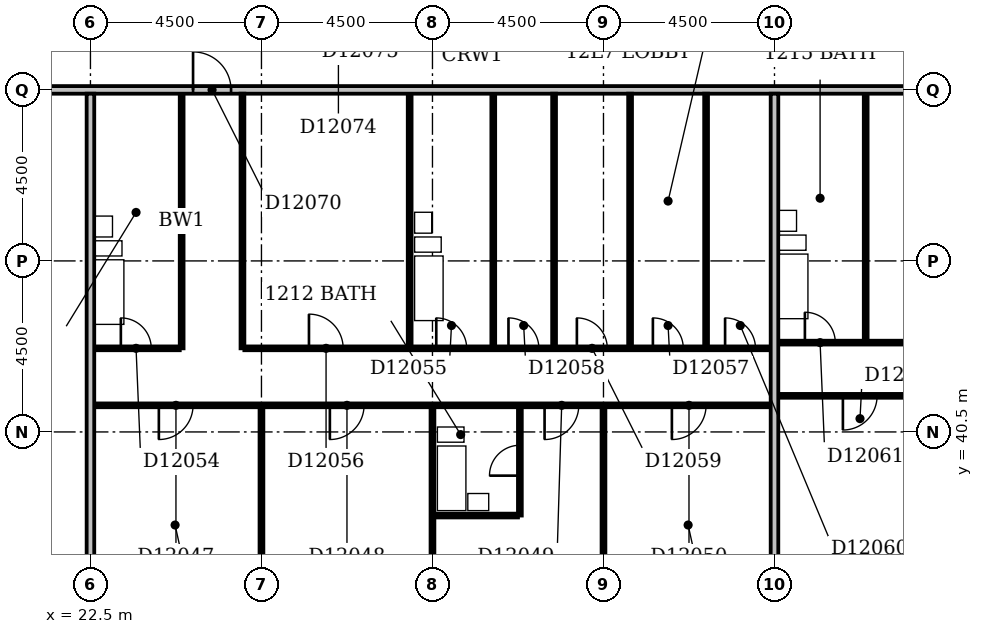
"""IFC4 building model, lengths in metres.
Left out: names, types, materials, properties, quantities, classifications, styles, units other than length and angle.
Written with IfcOpenShell. Run it as: python <this file> out.ifc"""

import sys

from ifc_helpers import new_model, si_unit, direction, frame, frame_2d, origin, place, context, subcontext, project, spatial, rectangle, extrude, element, fill, save


model = new_model("IFC4")
c1 = context("Model", 3, precision=1e-05, world=origin(), true_north=direction((0.0, 1.0)))
c2 = subcontext(c1, "Body", "Model", "MODEL_VIEW")
j1 = project(units=[si_unit("LENGTHUNIT", "METRE"), si_unit("PLANEANGLEUNIT", "RADIAN")], contexts=[c1])
p1 = place(None, origin())
s1 = spatial("IfcSite", under=j1, at=p1, CompositionType="ELEMENT")
p2 = place(p1, origin())
s2 = spatial("IfcBuilding", under=s1, at=p2, CompositionType="ELEMENT")
p3 = place(p2, frame((0.0, 0.0, 54.2)))
s3 = spatial("IfcBuildingStorey", under=s2, at=p3, CompositionType="ELEMENT", Elevation=54.2)
p4 = place(p3, frame((22.5, 36.6, 0.0), z_axis=(0.0, 0.0, 1.0), x_axis=(0.0, 1.0, 0.0)))
e1 = element("IfcWall", 1, at=p4, inside=s3, PredefinedType="PARTITIONING", context=c2, shape_type="SweptSolid", body=[
    extrude(rectangle(XDim=12.8, YDim=0.2, at=frame_2d((6.4, 0.0))), origin(), (0.0, 0.0, 1.0), 3.3),
])
p5 = place(p3, frame((27.0, 36.6, 0.0), z_axis=(0.0, 0.0, 1.0), x_axis=(0.0, 1.0, 0.0)))
e2 = element("IfcWall", 2, at=p5, inside=s3, PredefinedType="PARTITIONING", context=c2, shape_type="SweptSolid", body=[
    extrude(rectangle(XDim=4.55, YDim=0.1, at=frame_2d((2.275, 0.0))), origin(), (0.0, 0.0, 1.0), 2.6),
])
p6 = place(p3, frame((31.5, 36.6, 0.0), z_axis=(0.0, 0.0, 1.0), x_axis=(0.0, 1.0, 0.0)))
e3 = element("IfcWall", 3, at=p6, inside=s3, PredefinedType="PARTITIONING", context=c2, shape_type="SweptSolid", body=[
    extrude(rectangle(XDim=4.55, YDim=0.1, at=frame_2d((2.275, 0.0))), origin(), (0.0, 0.0, 1.0), 3.3),
])
p7 = place(p3, frame((36.0, 36.6, 0.0), z_axis=(0.0, 0.0, 1.0), x_axis=(0.0, 1.0, 0.0)))
e4 = element("IfcWall", 4, at=p7, inside=s3, PredefinedType="PARTITIONING", context=c2, shape_type="SweptSolid", body=[
    extrude(rectangle(XDim=4.55, YDim=0.1, at=frame_2d((2.275, 0.0))), origin(), (0.0, 0.0, 1.0), 2.4),
])
p8 = place(p3, frame((40.5, 36.6, 0.0), z_axis=(0.0, 0.0, 1.0), x_axis=(0.0, 1.0, 0.0)))
e5 = element("IfcWall", 5, at=p8, inside=s3, PredefinedType="PARTITIONING", context=c2, shape_type="SweptSolid", body=[
    extrude(rectangle(XDim=12.8, YDim=0.2, at=frame_2d((6.4, 0.0))), origin(), (0.0, 0.0, 1.0), 3.3),
])
p9 = place(p3, frame((31.55, 38.3, 0.0), z_axis=(0.0, 0.0, 1.0), x_axis=(1.0, 0.0, 0.0)))
e6 = element("IfcWall", 6, at=p9, inside=s3, PredefinedType="PLUMBINGWALL", context=c2, shape_type="SweptSolid", body=[
    extrude(rectangle(XDim=2.2, YDim=0.1, at=frame_2d((1.1, 0.0))), origin(), (0.0, 0.0, 1.0), 3.3),
])
p10 = place(p3, frame((33.8, 38.3, 0.0), z_axis=(0.0, 0.0, 1.0), x_axis=(0.0, 1.0, 0.0)))
e7 = element("IfcWall", 7, at=p10, inside=s3, PredefinedType="PLUMBINGWALL", context=c2, shape_type="SweptSolid", body=[
    extrude(rectangle(XDim=2.85, YDim=0.1, at=frame_2d((1.425, 0.0))), origin(), (0.0, 0.0, 1.0), 3.3),
])
p11 = place(p10, frame((1.05, 0.0, 0.0)))
e8 = element("IfcOpeningElement", 8, at=p11, cuts=e7, PredefinedType="OPENING", context=c2, shape_type="SweptSolid", body=[
    extrude(rectangle(XDim=0.8, YDim=2.1, at=frame_2d((0.4, 1.05))), frame((0.0, 0.062, 0.0), z_axis=(0.0, -1.0, 0.0), x_axis=(1.0, 0.0, 0.0)), (0.0, 0.0, 1.0), 0.124),
])
p12 = place(p3, frame((22.6, 41.2, 0.0), z_axis=(0.0, 0.0, 1.0), x_axis=(1.0, 0.0, 0.0)))
e9 = element("IfcWall", 9, at=p12, inside=s3, PredefinedType="PARTITIONING", context=c2, shape_type="SweptSolid", body=[
    extrude(rectangle(XDim=17.8, YDim=0.1, at=frame_2d((8.9, 0.0))), origin(), (0.0, 0.0, 1.0), 3.3),
])
p13 = place(p12, frame((1.7, 0.0, 0.0)))
e10 = element("IfcOpeningElement", 10, at=p13, cuts=e9, PredefinedType="OPENING", context=c2, shape_type="SweptSolid", body=[
    extrude(rectangle(XDim=0.9, YDim=2.1, at=frame_2d((0.45, 1.05))), frame((0.0, 0.062, 0.0), z_axis=(0.0, -1.0, 0.0), x_axis=(1.0, 0.0, 0.0)), (0.0, 0.0, 1.0), 0.124),
])
p14 = place(p12, frame((6.2, 0.0, 0.0)))
e11 = element("IfcOpeningElement", 11, at=p14, cuts=e9, PredefinedType="OPENING", context=c2, shape_type="SweptSolid", body=[
    extrude(rectangle(XDim=0.9, YDim=2.1, at=frame_2d((0.45, 1.05))), frame((0.0, 0.062, 0.0), z_axis=(0.0, -1.0, 0.0), x_axis=(1.0, 0.0, 0.0)), (0.0, 0.0, 1.0), 0.124),
])
p15 = place(p12, frame((11.85, 0.0, 0.0)))
e12 = element("IfcOpeningElement", 12, at=p15, cuts=e9, PredefinedType="OPENING", context=c2, shape_type="SweptSolid", body=[
    extrude(rectangle(XDim=0.9, YDim=2.1, at=frame_2d((0.45, 1.05))), frame((0.0, 0.062, 0.0), z_axis=(0.0, -1.0, 0.0), x_axis=(1.0, 0.0, 0.0)), (0.0, 0.0, 1.0), 0.124),
])
p16 = place(p12, frame((15.2, 0.0, 0.0)))
e13 = element("IfcOpeningElement", 13, at=p16, cuts=e9, PredefinedType="OPENING", context=c2, shape_type="SweptSolid", body=[
    extrude(rectangle(XDim=0.9, YDim=2.1, at=frame_2d((0.45, 1.05))), frame((0.0, 0.062, 0.0), z_axis=(0.0, -1.0, 0.0), x_axis=(1.0, 0.0, 0.0)), (0.0, 0.0, 1.0), 0.124),
])
p17 = place(p3, frame((40.6, 41.45, 0.0), z_axis=(0.0, 0.0, 1.0), x_axis=(1.0, 0.0, 0.0)))
e14 = element("IfcWall", 14, at=p17, inside=s3, PredefinedType="PARTITIONING", context=c2, shape_type="SweptSolid", body=[
    extrude(rectangle(XDim=13.3, YDim=0.1, at=frame_2d((6.65, 0.0))), origin(), (0.0, 0.0, 1.0), 3.3),
])
p18 = place(p17, frame((1.7, 0.0, 0.0)))
e15 = element("IfcOpeningElement", 15, at=p18, cuts=e14, PredefinedType="OPENING", context=c2, shape_type="SweptSolid", body=[
    extrude(rectangle(XDim=0.9, YDim=2.1, at=frame_2d((0.45, 1.05))), frame((0.0, 0.062, 0.0), z_axis=(0.0, -1.0, 0.0), x_axis=(1.0, 0.0, 0.0)), (0.0, 0.0, 1.0), 0.124),
])
p19 = place(p17, frame((6.2, 0.0, 0.0)))
e16 = element("IfcOpeningElement", 16, at=p19, cuts=e14, PredefinedType="OPENING", context=c2, shape_type="SweptSolid", body=[
    extrude(rectangle(XDim=0.9, YDim=2.1, at=frame_2d((0.45, 1.05))), frame((0.0, 0.062, 0.0), z_axis=(0.0, -1.0, 0.0), x_axis=(1.0, 0.0, 0.0)), (0.0, 0.0, 1.0), 0.124),
])
p20 = place(p17, frame((10.7, 0.0, 0.0)))
e17 = element("IfcOpeningElement", 17, at=p20, cuts=e14, PredefinedType="OPENING", context=c2, shape_type="SweptSolid", body=[
    extrude(rectangle(XDim=0.9, YDim=2.1, at=frame_2d((0.45, 1.05))), frame((0.0, 0.062, 0.0), z_axis=(0.0, -1.0, 0.0), x_axis=(1.0, 0.0, 0.0)), (0.0, 0.0, 1.0), 0.124),
])
p21 = place(p3, frame((22.6, 42.7, 0.0), z_axis=(0.0, 0.0, 1.0), x_axis=(1.0, 0.0, 0.0)))
e18 = element("IfcWall", 18, at=p21, inside=s3, PredefinedType="PARTITIONING", context=c2, shape_type="SweptSolid", body=[
    extrude(rectangle(XDim=2.25, YDim=0.1, at=frame_2d((1.125, 0.0))), origin(), (0.0, 0.0, 1.0), 3.3),
])
p22 = place(p21, frame((0.7, 0.0, 0.0)))
e19 = element("IfcOpeningElement", 19, at=p22, cuts=e18, PredefinedType="OPENING", context=c2, shape_type="SweptSolid", body=[
    extrude(rectangle(XDim=0.8, YDim=2.1, at=frame_2d((0.4, 1.05))), frame((0.0, 0.062, 0.0), z_axis=(0.0, -1.0, 0.0), x_axis=(1.0, 0.0, 0.0)), (0.0, 0.0, 1.0), 0.124),
])
p23 = place(p3, frame((24.9, 42.7, 0.0), z_axis=(0.0, 0.0, 1.0), x_axis=(0.0, 1.0, 0.0)))
e20 = element("IfcWall", 20, at=p23, inside=s3, PredefinedType="PLUMBINGWALL", context=c2, shape_type="SweptSolid", body=[
    extrude(rectangle(XDim=6.7, YDim=0.1, at=frame_2d((3.35, 0.0))), origin(), (0.0, 0.0, 1.0), 3.3),
])
p24 = place(p3, frame((26.5, 42.7, 0.0), z_axis=(0.0, 0.0, 1.0), x_axis=(0.0, 1.0, 0.0)))
e21 = element("IfcWall", 21, at=p24, inside=s3, PredefinedType="PARTITIONING", context=c2, shape_type="SweptSolid", body=[
    extrude(rectangle(XDim=6.7, YDim=0.1, at=frame_2d((3.35, 0.0))), origin(), (0.0, 0.0, 1.0), 2.6),
])
p25 = place(p3, frame((26.55, 42.7, 0.0), z_axis=(0.0, 0.0, 1.0), x_axis=(1.0, 0.0, 0.0)))
e22 = element("IfcWall", 22, at=p25, inside=s3, PredefinedType="PARTITIONING", context=c2, shape_type="SweptSolid", body=[
    extrude(rectangle(XDim=13.85, YDim=0.1, at=frame_2d((6.925, 0.0))), origin(), (0.0, 0.0, 1.0), 3.3),
])
p26 = place(p25, frame((5.05, 0.0, 0.0)))
e23 = element("IfcOpeningElement", 23, at=p26, cuts=e22, PredefinedType="OPENING", context=c2, shape_type="SweptSolid", body=[
    extrude(rectangle(XDim=0.8, YDim=2.1, at=frame_2d((0.4, 1.05))), frame((0.0, 0.062, 0.0), z_axis=(0.0, -1.0, 0.0), x_axis=(1.0, 0.0, 0.0)), (0.0, 0.0, 1.0), 0.124),
])
p27 = place(p25, frame((1.7, 0.0, 0.0)))
e24 = element("IfcOpeningElement", 24, at=p27, cuts=e22, PredefinedType="OPENING", context=c2, shape_type="SweptSolid", body=[
    extrude(rectangle(XDim=0.9, YDim=2.1, at=frame_2d((0.45, 1.05))), frame((0.0, 0.062, 0.0), z_axis=(0.0, -1.0, 0.0), x_axis=(1.0, 0.0, 0.0)), (0.0, 0.0, 1.0), 0.124),
])
p28 = place(p25, frame((10.75, 0.0, 0.0)))
e25 = element("IfcOpeningElement", 25, at=p28, cuts=e22, PredefinedType="OPENING", context=c2, shape_type="SweptSolid", body=[
    extrude(rectangle(XDim=0.8, YDim=2.1, at=frame_2d((0.4, 1.05))), frame((0.0, 0.062, 0.0), z_axis=(0.0, -1.0, 0.0), x_axis=(1.0, 0.0, 0.0)), (0.0, 0.0, 1.0), 0.124),
])
p29 = place(p25, frame((6.95, 0.0, 0.0)))
e26 = element("IfcOpeningElement", 26, at=p29, cuts=e22, PredefinedType="OPENING", context=c2, shape_type="SweptSolid", body=[
    extrude(rectangle(XDim=0.8, YDim=2.1, at=frame_2d((0.4, 1.05))), frame((0.0, 0.062, 0.0), z_axis=(0.0, -1.0, 0.0), x_axis=(1.0, 0.0, 0.0)), (0.0, 0.0, 1.0), 0.124),
])
p30 = place(p25, frame((8.75, 0.0, 0.0)))
e27 = element("IfcOpeningElement", 27, at=p30, cuts=e22, PredefinedType="OPENING", context=c2, shape_type="SweptSolid", body=[
    extrude(rectangle(XDim=0.8, YDim=2.1, at=frame_2d((0.4, 1.05))), frame((0.0, 0.062, 0.0), z_axis=(0.0, -1.0, 0.0), x_axis=(1.0, 0.0, 0.0)), (0.0, 0.0, 1.0), 0.124),
])
p31 = place(p25, frame((12.65, 0.0, 0.0)))
e28 = element("IfcOpeningElement", 28, at=p31, cuts=e22, PredefinedType="OPENING", context=c2, shape_type="SweptSolid", body=[
    extrude(rectangle(XDim=0.8, YDim=2.1, at=frame_2d((0.4, 1.05))), frame((0.0, 0.062, 0.0), z_axis=(0.0, -1.0, 0.0), x_axis=(1.0, 0.0, 0.0)), (0.0, 0.0, 1.0), 0.124),
])
for number, where, z_axis, x_axis in (
    (29, (30.9, 42.75, 0.0), (0.0, 0.0, 1.0), (0.0, 1.0, 0.0)),
    (30, (33.1, 42.75, 0.0), (0.0, 0.0, 1.0), (0.0, 1.0, 0.0)),
):
    element("IfcWall", number, at=place(p3, frame(where, z_axis=z_axis, x_axis=x_axis)), inside=s3, PredefinedType="PLUMBINGWALL", context=c2, shape_type="SweptSolid", body=[
        extrude(rectangle(XDim=6.65, YDim=0.1, at=frame_2d((3.325, 0.0))), origin(), (0.0, 0.0, 1.0), 3.3),
    ])
p32 = place(p3, frame((34.7, 42.75, 0.0), z_axis=(0.0, 0.0, 1.0), x_axis=(0.0, 1.0, 0.0)))
e31 = element("IfcWall", 31, at=p32, inside=s3, PredefinedType="PARTITIONING", context=c2, shape_type="SweptSolid", body=[
    extrude(rectangle(XDim=6.65, YDim=0.1, at=frame_2d((3.325, 0.0))), origin(), (0.0, 0.0, 1.0), 3.3),
])
p33 = place(p3, frame((36.7, 42.75, 0.0), z_axis=(0.0, 0.0, 1.0), x_axis=(0.0, 1.0, 0.0)))
e32 = element("IfcWall", 32, at=p33, inside=s3, PredefinedType="PARTITIONING", context=c2, shape_type="SweptSolid", body=[
    extrude(rectangle(XDim=6.65, YDim=0.1, at=frame_2d((3.325, 0.0))), origin(), (0.0, 0.0, 1.0), 2.4),
])
p34 = place(p3, frame((38.7, 42.75, 0.0), z_axis=(0.0, 0.0, 1.0), x_axis=(0.0, 1.0, 0.0)))
e33 = element("IfcWall", 33, at=p34, inside=s3, PredefinedType="PARTITIONING", context=c2, shape_type="SweptSolid", body=[
    extrude(rectangle(XDim=6.65, YDim=0.1, at=frame_2d((3.325, 0.0))), origin(), (0.0, 0.0, 1.0), 3.3),
])
p35 = place(p3, frame((40.6, 42.85, 0.0), z_axis=(0.0, 0.0, 1.0), x_axis=(1.0, 0.0, 0.0)))
e34 = element("IfcWall", 34, at=p35, inside=s3, PredefinedType="PARTITIONING", context=c2, shape_type="SweptSolid", body=[
    extrude(rectangle(XDim=8.15, YDim=0.1, at=frame_2d((4.075, 0.0))), origin(), (0.0, 0.0, 1.0), 3.3),
])
p36 = place(p35, frame((0.7, 0.0, 0.0)))
e35 = element("IfcOpeningElement", 35, at=p36, cuts=e34, PredefinedType="OPENING", context=c2, shape_type="SweptSolid", body=[
    extrude(rectangle(XDim=0.8, YDim=2.1, at=frame_2d((0.4, 1.05))), frame((0.0, 0.062, 0.0), z_axis=(0.0, -1.0, 0.0), x_axis=(1.0, 0.0, 0.0)), (0.0, 0.0, 1.0), 0.124),
])
p37 = place(p35, frame((4.8, 0.0, 0.0)))
e36 = element("IfcOpeningElement", 36, at=p37, cuts=e34, PredefinedType="OPENING", context=c2, shape_type="SweptSolid", body=[
    extrude(rectangle(XDim=0.9, YDim=2.1, at=frame_2d((0.45, 1.05))), frame((0.0, 0.062, 0.0), z_axis=(0.0, -1.0, 0.0), x_axis=(1.0, 0.0, 0.0)), (0.0, 0.0, 1.0), 0.124),
])
p38 = place(p3, frame((42.9, 42.9, 0.0), z_axis=(0.0, 0.0, 1.0), x_axis=(0.0, 1.0, 0.0)))
e37 = element("IfcWall", 37, at=p38, inside=s3, PredefinedType="PLUMBINGWALL", context=c2, shape_type="SweptSolid", body=[
    extrude(rectangle(XDim=6.5, YDim=0.1, at=frame_2d((3.25, 0.0))), origin(), (0.0, 0.0, 1.0), 3.3),
])
p39 = place(p3, frame((9.1, 49.5, 0.0), z_axis=(0.0, 0.0, 1.0), x_axis=(1.0, 0.0, 0.0)))
e38 = element("IfcWall", 38, at=p39, inside=s3, PredefinedType="PARTITIONING", context=c2, shape_type="SweptSolid", body=[
    extrude(rectangle(XDim=57.8, YDim=0.2, at=frame_2d((28.9, 0.0))), origin(), (0.0, 0.0, 1.0), 3.3),
])
p40 = place(p39, frame((16.1, 0.0, 0.0)))
e39 = element("IfcOpeningElement", 39, at=p40, cuts=e38, PredefinedType="OPENING", context=c2, shape_type="SweptSolid", body=[
    extrude(rectangle(XDim=1.0, YDim=2.1, at=frame_2d((0.5, 1.05))), frame((0.0, 0.112, 0.0), z_axis=(0.0, -1.0, 0.0), x_axis=(1.0, 0.0, 0.0)), (0.0, 0.0, 1.0), 0.224),
])
p41 = place(p39, frame((40.0, 0.0, 0.0)))
e40 = element("IfcOpeningElement", 40, at=p41, cuts=e38, PredefinedType="OPENING", context=c2, shape_type="SweptSolid", body=[
    extrude(rectangle(XDim=1.0, YDim=2.1, at=frame_2d((0.5, 1.05))), frame((0.0, 0.112, 0.0), z_axis=(0.0, -1.0, 0.0), x_axis=(1.0, 0.0, 0.0)), (0.0, 0.0, 1.0), 0.224),
])
p42 = place(p39, frame((45.2, 0.0, 0.0)))
e41 = element("IfcOpeningElement", 41, at=p42, cuts=e38, PredefinedType="OPENING", context=c2, shape_type="SweptSolid", body=[
    extrude(rectangle(XDim=1.0, YDim=2.1, at=frame_2d((0.5, 1.05))), frame((0.0, 0.112, 0.0), z_axis=(0.0, -1.0, 0.0), x_axis=(1.0, 0.0, 0.0)), (0.0, 0.0, 1.0), 0.224),
])
p43 = place(p39, frame((3.9, 0.0, 0.0)))
e42 = element("IfcOpeningElement", 42, at=p43, cuts=e38, PredefinedType="OPENING", context=c2, shape_type="SweptSolid", body=[
    extrude(rectangle(XDim=0.9, YDim=2.1, at=frame_2d((0.45, 1.05))), frame((0.0, 0.112, 0.0), z_axis=(0.0, -1.0, 0.0), x_axis=(1.0, 0.0, 0.0)), (0.0, 0.0, 1.0), 0.224),
])
p44 = place(p11, origin())
e43 = element("IfcDoor", 43, at=p44, inside=s3, OperationType="SINGLE_SWING_LEFT", PredefinedType="DOOR", context=c2, shape_type="SweptSolid", body=[
    extrude(rectangle(XDim=0.8, YDim=2.1, at=frame_2d((0.4, 1.05))), frame((0.0, 0.025, 0.0), z_axis=(0.0, -1.0, 0.0), x_axis=(1.0, 0.0, 0.0)), (0.0, 0.0, 1.0), 0.05),
])
fill(e8, e43)
p45 = place(p13, frame((0.9, 0.0, 0.0), z_axis=(0.0, 0.0, 1.0), x_axis=(-1.0, 0.0, 0.0)))
e44 = element("IfcDoor", 44, at=p45, inside=s3, OperationType="SINGLE_SWING_RIGHT", PredefinedType="DOOR", context=c2, shape_type="SweptSolid", body=[
    extrude(rectangle(XDim=0.9, YDim=2.1, at=frame_2d((0.45, 1.05))), frame((0.0, 0.025, 0.0), z_axis=(0.0, -1.0, 0.0), x_axis=(1.0, 0.0, 0.0)), (0.0, 0.0, 1.0), 0.05),
])
fill(e10, e44)
p46 = place(p14, frame((0.9, 0.0, 0.0), z_axis=(0.0, 0.0, 1.0), x_axis=(-1.0, 0.0, 0.0)))
e45 = element("IfcDoor", 45, at=p46, inside=s3, OperationType="SINGLE_SWING_RIGHT", PredefinedType="DOOR", context=c2, shape_type="SweptSolid", body=[
    extrude(rectangle(XDim=0.9, YDim=2.1, at=frame_2d((0.45, 1.05))), frame((0.0, 0.025, 0.0), z_axis=(0.0, -1.0, 0.0), x_axis=(1.0, 0.0, 0.0)), (0.0, 0.0, 1.0), 0.05),
])
fill(e11, e45)
p47 = place(p15, frame((0.9, 0.0, 0.0), z_axis=(0.0, 0.0, 1.0), x_axis=(-1.0, 0.0, 0.0)))
e46 = element("IfcDoor", 46, at=p47, inside=s3, OperationType="SINGLE_SWING_RIGHT", PredefinedType="DOOR", context=c2, shape_type="SweptSolid", body=[
    extrude(rectangle(XDim=0.9, YDim=2.1, at=frame_2d((0.45, 1.05))), frame((0.0, 0.025, 0.0), z_axis=(0.0, -1.0, 0.0), x_axis=(1.0, 0.0, 0.0)), (0.0, 0.0, 1.0), 0.05),
])
fill(e12, e46)
p48 = place(p16, frame((0.9, 0.0, 0.0), z_axis=(0.0, 0.0, 1.0), x_axis=(-1.0, 0.0, 0.0)))
e47 = element("IfcDoor", 47, at=p48, inside=s3, OperationType="SINGLE_SWING_RIGHT", PredefinedType="DOOR", context=c2, shape_type="SweptSolid", body=[
    extrude(rectangle(XDim=0.9, YDim=2.1, at=frame_2d((0.45, 1.05))), frame((0.0, 0.025, 0.0), z_axis=(0.0, -1.0, 0.0), x_axis=(1.0, 0.0, 0.0)), (0.0, 0.0, 1.0), 0.05),
])
fill(e13, e47)
p49 = place(p18, frame((0.9, 0.0, 0.0), z_axis=(0.0, 0.0, 1.0), x_axis=(-1.0, 0.0, 0.0)))
e48 = element("IfcDoor", 48, at=p49, inside=s3, OperationType="SINGLE_SWING_RIGHT", PredefinedType="DOOR", context=c2, shape_type="SweptSolid", body=[
    extrude(rectangle(XDim=0.9, YDim=2.1, at=frame_2d((0.45, 1.05))), frame((0.0, 0.025, 0.0), z_axis=(0.0, -1.0, 0.0), x_axis=(1.0, 0.0, 0.0)), (0.0, 0.0, 1.0), 0.05),
])
fill(e15, e48)
p50 = place(p22, origin())
e49 = element("IfcDoor", 49, at=p50, inside=s3, OperationType="SINGLE_SWING_LEFT", PredefinedType="DOOR", context=c2, shape_type="SweptSolid", body=[
    extrude(rectangle(XDim=0.8, YDim=2.1, at=frame_2d((0.4, 1.05))), frame((0.0, 0.025, 0.0), z_axis=(0.0, -1.0, 0.0), x_axis=(1.0, 0.0, 0.0)), (0.0, 0.0, 1.0), 0.05),
])
fill(e19, e49)
p51 = place(p26, origin())
e50 = element("IfcDoor", 50, at=p51, inside=s3, OperationType="SINGLE_SWING_LEFT", PredefinedType="DOOR", context=c2, shape_type="SweptSolid", body=[
    extrude(rectangle(XDim=0.8, YDim=2.1, at=frame_2d((0.4, 1.05))), frame((0.0, 0.025, 0.0), z_axis=(0.0, -1.0, 0.0), x_axis=(1.0, 0.0, 0.0)), (0.0, 0.0, 1.0), 0.05),
])
fill(e23, e50)
p52 = place(p27, origin())
e51 = element("IfcDoor", 51, at=p52, inside=s3, OperationType="SINGLE_SWING_LEFT", PredefinedType="DOOR", context=c2, shape_type="SweptSolid", body=[
    extrude(rectangle(XDim=0.9, YDim=2.1, at=frame_2d((0.45, 1.05))), frame((0.0, 0.025, 0.0), z_axis=(0.0, -1.0, 0.0), x_axis=(1.0, 0.0, 0.0)), (0.0, 0.0, 1.0), 0.05),
])
fill(e24, e51)
p53 = place(p28, origin())
e52 = element("IfcDoor", 52, at=p53, inside=s3, OperationType="SINGLE_SWING_LEFT", PredefinedType="DOOR", context=c2, shape_type="SweptSolid", body=[
    extrude(rectangle(XDim=0.8, YDim=2.1, at=frame_2d((0.4, 1.05))), frame((0.0, 0.025, 0.0), z_axis=(0.0, -1.0, 0.0), x_axis=(1.0, 0.0, 0.0)), (0.0, 0.0, 1.0), 0.05),
])
fill(e25, e52)
p54 = place(p29, origin())
e53 = element("IfcDoor", 53, at=p54, inside=s3, OperationType="SINGLE_SWING_LEFT", PredefinedType="DOOR", context=c2, shape_type="SweptSolid", body=[
    extrude(rectangle(XDim=0.8, YDim=2.1, at=frame_2d((0.4, 1.05))), frame((0.0, 0.025, 0.0), z_axis=(0.0, -1.0, 0.0), x_axis=(1.0, 0.0, 0.0)), (0.0, 0.0, 1.0), 0.05),
])
fill(e26, e53)
p55 = place(p30, origin())
e54 = element("IfcDoor", 54, at=p55, inside=s3, OperationType="SINGLE_SWING_LEFT", PredefinedType="DOOR", context=c2, shape_type="SweptSolid", body=[
    extrude(rectangle(XDim=0.8, YDim=2.1, at=frame_2d((0.4, 1.05))), frame((0.0, 0.025, 0.0), z_axis=(0.0, -1.0, 0.0), x_axis=(1.0, 0.0, 0.0)), (0.0, 0.0, 1.0), 0.05),
])
fill(e27, e54)
p56 = place(p31, origin())
e55 = element("IfcDoor", 55, at=p56, inside=s3, OperationType="SINGLE_SWING_LEFT", PredefinedType="DOOR", context=c2, shape_type="SweptSolid", body=[
    extrude(rectangle(XDim=0.8, YDim=2.1, at=frame_2d((0.4, 1.05))), frame((0.0, 0.025, 0.0), z_axis=(0.0, -1.0, 0.0), x_axis=(1.0, 0.0, 0.0)), (0.0, 0.0, 1.0), 0.05),
])
fill(e28, e55)
p57 = place(p36, origin())
e56 = element("IfcDoor", 56, at=p57, inside=s3, OperationType="SINGLE_SWING_LEFT", PredefinedType="DOOR", context=c2, shape_type="SweptSolid", body=[
    extrude(rectangle(XDim=0.8, YDim=2.1, at=frame_2d((0.4, 1.05))), frame((0.0, 0.025, 0.0), z_axis=(0.0, -1.0, 0.0), x_axis=(1.0, 0.0, 0.0)), (0.0, 0.0, 1.0), 0.05),
])
fill(e35, e56)
p58 = place(p40, origin())
e57 = element("IfcDoor", 57, at=p58, inside=s3, OperationType="SINGLE_SWING_LEFT", PredefinedType="DOOR", context=c2, shape_type="SweptSolid", body=[
    extrude(rectangle(XDim=1.0, YDim=2.1, at=frame_2d((0.5, 1.05))), frame((0.0, 0.025, 0.0), z_axis=(0.0, -1.0, 0.0), x_axis=(1.0, 0.0, 0.0)), (0.0, 0.0, 1.0), 0.05),
])
fill(e39, e57)
save(model, sys.argv[1])
